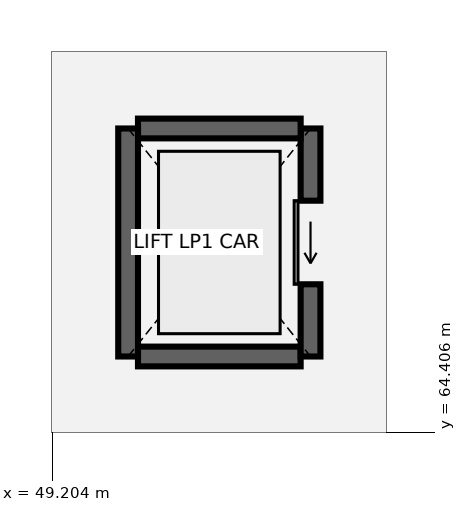
"""IFC4 building model, lengths in metres.
Left out: names, types, materials, properties, quantities, classifications, styles, units other than length and angle.
Written with IfcOpenShell. Run it as: python <this file> out.ifc"""

import sys

from ifc_helpers import new_model, si_unit, direction, frame, frame_2d, origin, place, context, subcontext, project, spatial, rectangle, extrude, element, fill, save


model = new_model("IFC4")
c1 = context("Model", 3, precision=1e-05, world=origin(), true_north=direction((0.0, 1.0)))
c2 = subcontext(c1, "Body", "Model", "MODEL_VIEW")
j1 = project(units=[si_unit("LENGTHUNIT", "METRE"), si_unit("PLANEANGLEUNIT", "RADIAN")], contexts=[c1])
p1 = place(None, origin())
s1 = spatial("IfcSite", under=j1, at=p1, CompositionType="ELEMENT")
p2 = place(p1, origin())
s2 = spatial("IfcBuilding", under=s1, at=p2, CompositionType="ELEMENT")
p3 = place(p2, frame((0.0, 0.0, -4.8)))
s3 = spatial("IfcBuildingStorey", under=s2, at=p3, CompositionType="ELEMENT", Elevation=-4.8)
p4 = place(p3, frame((50.33, 65.4, 0.0), z_axis=(0.0, 0.0, 1.0), x_axis=(1.0, 0.0, 0.0)))
e1 = element("IfcWall", 1, at=p4, inside=s3, PredefinedType="SHEAR", context=c2, shape_type="SweptSolid", body=[
    extrude(rectangle(XDim=2.14, YDim=0.26, at=frame_2d((1.07, 0.0))), origin(), (0.0, 0.0, 1.0), 4.46),
])
p5 = place(p3, frame((52.6, 65.4, 0.0), z_axis=(0.0, 0.0, 1.0), x_axis=(0.0, 1.0, 0.0)))
e2 = element("IfcWall", 2, at=p5, inside=s3, PredefinedType="SHEAR", context=c2, shape_type="SweptSolid", body=[
    extrude(rectangle(XDim=3.0, YDim=0.26, at=frame_2d((1.5, 0.0))), origin(), (0.0, 0.0, 1.0), 4.46),
])
p6 = place(p5, frame((0.95, 0.0, 0.0)))
e3 = element("IfcOpeningElement", 3, at=p6, cuts=e2, PredefinedType="OPENING", context=c2, shape_type="SweptSolid", body=[
    extrude(rectangle(XDim=1.1, YDim=2.1, at=frame_2d((0.55, 1.05))), frame((0.0, 0.14, 0.0), z_axis=(0.0, -1.0, 0.0), x_axis=(1.0, 0.0, 0.0)), (0.0, 0.0, 1.0), 0.28),
])
p7 = place(p3, frame((52.47, 68.4, 0.0), z_axis=(0.0, 0.0, 1.0), x_axis=(-1.0, 0.0, 0.0)))
e4 = element("IfcWall", 4, at=p7, inside=s3, PredefinedType="SHEAR", context=c2, shape_type="SweptSolid", body=[
    extrude(rectangle(XDim=2.14, YDim=0.26, at=frame_2d((1.07, 0.0))), origin(), (0.0, 0.0, 1.0), 4.46),
])
p8 = place(p3, frame((50.2, 68.4, 0.0), z_axis=(0.0, 0.0, 1.0), x_axis=(0.0, -1.0, 0.0)))
e5 = element("IfcWall", 5, at=p8, inside=s3, PredefinedType="SHEAR", context=c2, shape_type="SweptSolid", body=[
    extrude(rectangle(XDim=3.0, YDim=0.26, at=frame_2d((1.5, 0.0))), origin(), (0.0, 0.0, 1.0), 4.46),
])
p9 = place(p6, origin())
e6 = element("IfcDoor", 6, at=p9, inside=s3, OperationType="SLIDING_TO_LEFT", PredefinedType="DOOR", context=c2, shape_type="SweptSolid", body=[
    extrude(rectangle(XDim=1.1, YDim=2.1, at=frame_2d((0.55, 1.05))), frame((0.0, 0.025, 0.0), z_axis=(0.0, -1.0, 0.0), x_axis=(1.0, 0.0, 0.0)), (0.0, 0.0, 1.0), 0.05),
])
fill(e3, e6)
save(model, sys.argv[1])
